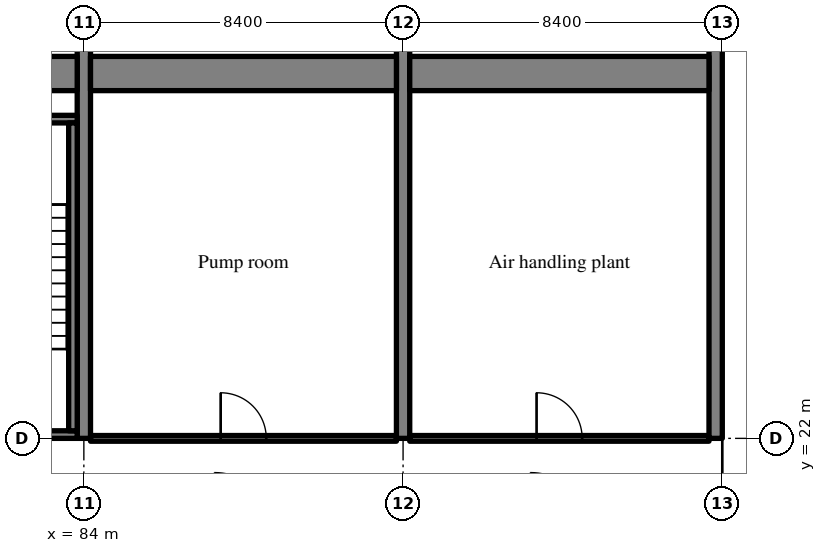
"""IFC4 building model, lengths in metres.
Left out: names, types, materials, properties, quantities, classifications, styles, units other than length and angle.
Written with IfcOpenShell. Run it as: python <this file> out.ifc"""

import sys

from ifc_helpers import new_model, si_unit, direction, frame, frame_2d, origin, place, context, subcontext, project, spatial, rectangle, extrude, source, transform, mapped, element, fill, save


model = new_model("IFC4")
c1 = context("Model", 3, precision=1e-05, world=origin(), true_north=direction((0.0, 1.0)))
c2 = subcontext(c1, "Body", "Model", "MODEL_VIEW")
j1 = project(units=[si_unit("LENGTHUNIT", "METRE"), si_unit("PLANEANGLEUNIT", "RADIAN")], contexts=[c1])
p1 = place(None, origin())
s1 = spatial("IfcSite", under=j1, at=p1, CompositionType="ELEMENT")
p2 = place(p1, origin())
s2 = spatial("IfcBuilding", under=s1, at=p2, CompositionType="ELEMENT")
p3 = place(p2, frame((0.0, 0.0, 140.8)))
s3 = spatial("IfcBuildingStorey", under=s2, at=p3, CompositionType="ELEMENT", Elevation=140.8)
m1 = source(origin(), c2, "Body", "SweptSolid", [
    extrude(rectangle(XDim=20.0, YDim=0.35, at=frame_2d((10.0, 0.0))), origin(), (0.0, 0.0, 1.0), 5.12),
])
p4 = place(p3, frame((84.0, 22.0, 0.0), z_axis=(0.0, 0.0, 1.0), x_axis=(0.0, 1.0, 0.0)))
e1 = element("IfcWall", 1, at=p4, inside=s3, PredefinedType="SHEAR", context=c2, shape_type="MappedRepresentation", body=[
    mapped(m1, transform((0.0, 0.0, 0.0), scale=1.0)),
])
m2 = source(origin(), c2, "Body", "SweptSolid", [
    extrude(rectangle(XDim=1.2, YDim=2.1, at=frame_2d((0.6, 1.05))), frame((0.0, 0.185, 0.0), z_axis=(0.0, -1.0, 0.0), x_axis=(1.0, 0.0, 0.0)), (0.0, 0.0, 1.0), 0.37),
])
p5 = place(p4, frame((13.4, 0.0, 0.0)))
e2 = element("IfcOpeningElement", 2, at=p5, cuts=e1, PredefinedType="OPENING", context=c2, shape_type="MappedRepresentation", body=[
    mapped(m2, transform((0.0, 0.0, 0.0), scale=1.0)),
])
p6 = place(p3, frame((92.4, 22.0, 0.0), z_axis=(0.0, 0.0, 1.0), x_axis=(0.0, 1.0, 0.0)))
e3 = element("IfcWall", 3, at=p6, inside=s3, PredefinedType="SHEAR", context=c2, shape_type="MappedRepresentation", body=[
    mapped(m1, transform((0.0, 0.0, 0.0), scale=1.0)),
])
p7 = place(p6, frame((13.4, 0.0, 0.0)))
e4 = element("IfcOpeningElement", 4, at=p7, cuts=e3, PredefinedType="OPENING", context=c2, shape_type="MappedRepresentation", body=[
    mapped(m2, transform((0.0, 0.0, 0.0), scale=1.0)),
])
m3 = source(origin(), c2, "Body", "SweptSolid", [
    extrude(rectangle(XDim=16.0, YDim=0.35, at=frame_2d((8.0, 0.0))), origin(), (0.0, 0.0, 1.0), 5.12),
])
p8 = place(p3, frame((100.625, 22.0, 0.0), z_axis=(0.0, 0.0, 1.0), x_axis=(0.0, 1.0, 0.0)))
e5 = element("IfcWall", 5, at=p8, inside=s3, PredefinedType="SHEAR", context=c2, shape_type="MappedRepresentation", body=[
    mapped(m3, transform((0.0, 0.0, 0.0), scale=1.0)),
])
m4 = source(origin(), c2, "Body", "SweptSolid", [
    extrude(rectangle(XDim=8.225, YDim=0.9, at=frame_2d((4.112, 0.0))), origin(), (0.0, 0.0, 1.0), 5.12),
])
p9 = place(p3, frame((75.6, 31.6, 0.0), z_axis=(0.0, 0.0, 1.0), x_axis=(1.0, 0.0, 0.0)))
e6 = element("IfcWall", 6, at=p9, inside=s3, PredefinedType="SHEAR", context=c2, shape_type="MappedRepresentation", body=[
    mapped(m4, transform((0.0, 0.0, 0.0), scale=1.0)),
])
m5 = source(origin(), c2, "Body", "SweptSolid", [
    extrude(rectangle(XDim=8.05, YDim=0.9, at=frame_2d((4.025, 0.0))), origin(), (0.0, 0.0, 1.0), 5.12),
])
p10 = place(p3, frame((84.175, 31.6, 0.0), z_axis=(0.0, 0.0, 1.0), x_axis=(1.0, 0.0, 0.0)))
e7 = element("IfcWall", 7, at=p10, inside=s3, PredefinedType="SHEAR", context=c2, shape_type="MappedRepresentation", body=[
    mapped(m5, transform((0.0, 0.0, 0.0), scale=1.0)),
])
m6 = source(origin(), c2, "Body", "SweptSolid", [
    extrude(rectangle(XDim=7.875, YDim=0.9, at=frame_2d((3.938, 0.0))), origin(), (0.0, 0.0, 1.0), 5.12),
])
p11 = place(p3, frame((92.575, 31.6, 0.0), z_axis=(0.0, 0.0, 1.0), x_axis=(1.0, 0.0, 0.0)))
e8 = element("IfcWall", 8, at=p11, inside=s3, PredefinedType="SHEAR", context=c2, shape_type="MappedRepresentation", body=[
    mapped(m6, transform((0.0, 0.0, 0.0), scale=1.0)),
])
m7 = source(origin(), c2, "Body", "SweptSolid", [
    extrude(rectangle(XDim=8.225, YDim=0.2, at=frame_2d((4.112, 0.0))), origin(), (0.0, 0.0, 1.0), 5.12),
])
p12 = place(p3, frame((83.825, 22.1, 0.0), z_axis=(0.0, 0.0, 1.0), x_axis=(-1.0, 0.0, 0.0)))
e9 = element("IfcWall", 9, at=p12, inside=s3, PredefinedType="SOLIDWALL", context=c2, shape_type="MappedRepresentation", body=[
    mapped(m7, transform((0.0, 0.0, 0.0), scale=1.0)),
])
m8 = source(origin(), c2, "Body", "SweptSolid", [
    extrude(rectangle(XDim=1.2, YDim=2.1, at=frame_2d((0.6, 1.05))), frame((0.0, 0.11, 0.0), z_axis=(0.0, -1.0, 0.0), x_axis=(1.0, 0.0, 0.0)), (0.0, 0.0, 1.0), 0.22),
])
p13 = place(p12, frame((6.025, 0.0, 0.0)))
e10 = element("IfcOpeningElement", 10, at=p13, cuts=e9, PredefinedType="OPENING", context=c2, shape_type="MappedRepresentation", body=[
    mapped(m8, transform((0.0, 0.0, 0.0), scale=1.0)),
])
p14 = place(p3, frame((83.825, 30.4, 0.0), z_axis=(0.0, 0.0, 1.0), x_axis=(-1.0, 0.0, 0.0)))
e11 = element("IfcWall", 11, at=p14, inside=s3, PredefinedType="SOLIDWALL", context=c2, shape_type="MappedRepresentation", body=[
    mapped(m7, transform((0.0, 0.0, 0.0), scale=1.0)),
])
m9 = source(origin(), c2, "Body", "SweptSolid", [
    extrude(rectangle(XDim=1.0, YDim=2.1, at=frame_2d((0.5, 1.05))), frame((0.0, 0.11, 0.0), z_axis=(0.0, -1.0, 0.0), x_axis=(1.0, 0.0, 0.0)), (0.0, 0.0, 1.0), 0.22),
])
p15 = place(p14, frame((6.125, 0.0, 0.0)))
e12 = element("IfcOpeningElement", 12, at=p15, cuts=e11, PredefinedType="OPENING", context=c2, shape_type="MappedRepresentation", body=[
    mapped(m9, transform((0.0, 0.0, 0.0), scale=1.0)),
])
m10 = source(origin(), c2, "Body", "SweptSolid", [
    extrude(rectangle(XDim=8.1, YDim=0.225, at=frame_2d((4.05, 0.0))), origin(), (0.0, 0.0, 1.0), 5.12),
])
p16 = place(p3, frame((83.713, 22.2, 0.0), z_axis=(0.0, 0.0, 1.0), x_axis=(0.0, 1.0, 0.0)))
e13 = element("IfcWall", 13, at=p16, inside=s3, PredefinedType="SOLIDWALL", context=c2, shape_type="MappedRepresentation", body=[
    mapped(m10, transform((0.0, 0.0, 0.0), scale=1.0)),
])
m11 = source(origin(), c2, "Body", "SweptSolid", [
    extrude(rectangle(XDim=8.05, YDim=0.15, at=frame_2d((4.025, 0.0))), origin(), (0.0, 0.0, 1.0), 4.37),
])
p17 = place(p3, frame((84.175, 22.0, 0.0), z_axis=(0.0, 0.0, 1.0), x_axis=(1.0, 0.0, 0.0)))
e14 = element("IfcWall", 14, at=p17, inside=s3, PredefinedType="PARTITIONING", context=c2, shape_type="MappedRepresentation", body=[
    mapped(m11, transform((0.0, 0.0, 0.0), scale=1.0)),
])
m12 = source(origin(), c2, "Body", "SweptSolid", [
    extrude(rectangle(XDim=1.2, YDim=2.1, at=frame_2d((0.6, 1.05))), frame((0.0, 0.085, 0.0), z_axis=(0.0, -1.0, 0.0), x_axis=(1.0, 0.0, 0.0)), (0.0, 0.0, 1.0), 0.17),
])
p18 = place(p17, frame((3.425, 0.0, 0.0)))
e15 = element("IfcOpeningElement", 15, at=p18, cuts=e14, PredefinedType="OPENING", context=c2, shape_type="MappedRepresentation", body=[
    mapped(m12, transform((0.0, 0.0, 0.0), scale=1.0)),
])
m13 = source(origin(), c2, "Body", "SweptSolid", [
    extrude(rectangle(XDim=7.875, YDim=0.15, at=frame_2d((3.938, 0.0))), origin(), (0.0, 0.0, 1.0), 4.37),
])
p19 = place(p3, frame((92.575, 22.0, 0.0), z_axis=(0.0, 0.0, 1.0), x_axis=(1.0, 0.0, 0.0)))
e16 = element("IfcWall", 16, at=p19, inside=s3, PredefinedType="PARTITIONING", context=c2, shape_type="MappedRepresentation", body=[
    mapped(m13, transform((0.0, 0.0, 0.0), scale=1.0)),
])
p20 = place(p19, frame((3.338, 0.0, 0.0)))
e17 = element("IfcOpeningElement", 17, at=p20, cuts=e16, PredefinedType="OPENING", context=c2, shape_type="MappedRepresentation", body=[
    mapped(m12, transform((0.0, 0.0, 0.0), scale=1.0)),
])
m14 = source(origin(), c2, "Body", "SweptSolid", [
    extrude(rectangle(XDim=1.2, YDim=2.1, at=frame_2d((0.6, 1.05))), frame((0.0, 0.025, 0.0), z_axis=(0.0, -1.0, 0.0), x_axis=(1.0, 0.0, 0.0)), (0.0, 0.0, 1.0), 0.05),
])
p21 = place(p18, origin())
e18 = element("IfcDoor", 18, at=p21, inside=s3, OperationType="SINGLE_SWING_LEFT", PredefinedType="DOOR", context=c2, shape_type="MappedRepresentation", body=[
    mapped(m14, transform((0.0, 0.0, 0.0), scale=1.0)),
])
fill(e15, e18)
p22 = place(p20, origin())
e19 = element("IfcDoor", 19, at=p22, inside=s3, OperationType="SINGLE_SWING_LEFT", PredefinedType="DOOR", context=c2, shape_type="MappedRepresentation", body=[
    mapped(m14, transform((0.0, 0.0, 0.0), scale=1.0)),
])
fill(e17, e19)
save(model, sys.argv[1])
